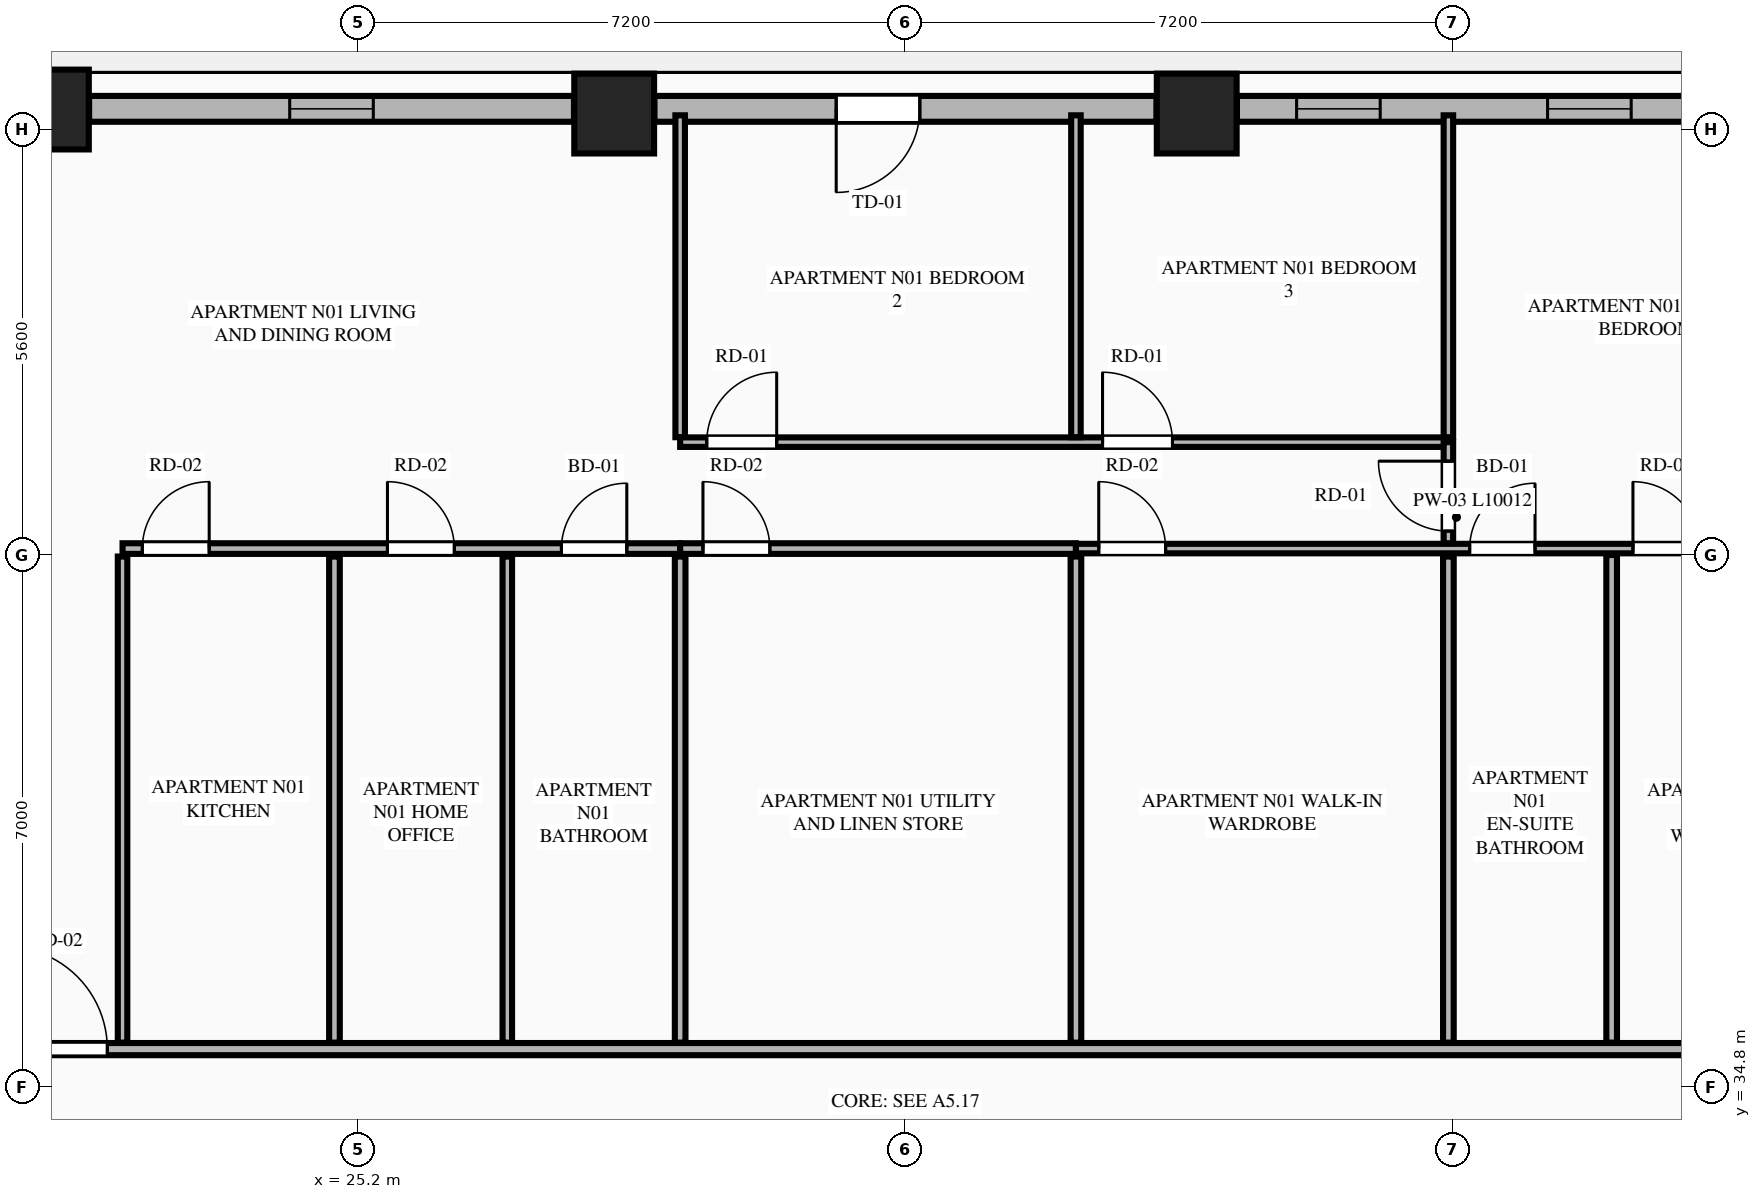
"""IFC4 building model, lengths in metres.
Left out: names, types, materials, properties, quantities, classifications, styles, units other than length and angle.
Written with IfcOpenShell. Run it as: python <this file> out.ifc"""

import sys

from ifc_helpers import new_model, si_unit, direction, frame, frame_2d, origin, origin_2d, place, context, subcontext, project, spatial, rectangle, extrude, element, fill, save


model = new_model("IFC4")
c1 = context("Model", 3, precision=1e-05, world=origin(), true_north=direction((0.0, 1.0)))
c2 = subcontext(c1, "Body", "Model", "MODEL_VIEW")
j1 = project(units=[si_unit("LENGTHUNIT", "METRE"), si_unit("PLANEANGLEUNIT", "RADIAN")], contexts=[c1])
p1 = place(None, origin())
s1 = spatial("IfcSite", under=j1, at=p1, CompositionType="ELEMENT")
p2 = place(p1, origin())
s2 = spatial("IfcBuilding", under=s1, at=p2, CompositionType="ELEMENT")
p3 = place(p2, frame((0.0, 0.0, 112.6)))
s3 = spatial("IfcBuildingStorey", under=s2, at=p3, CompositionType="ELEMENT", Elevation=112.6)
for number, where, z_axis, x_axis in (
    (1, (36.232, 47.608, 0.0), (0.0, 0.0, 1.0), (1.0, 0.0, 0.0)),
    (2, (28.568, 47.608, 0.0), (0.0, 0.0, 1.0), (1.0, 0.0, 0.0)),
    (3, (21.131, 47.661, 0.0), (0.0, 0.0, 1.0), (1.0, 0.0, 0.0)),
):
    element("IfcColumn", number, at=place(p3, frame(where, z_axis=z_axis, x_axis=x_axis)), inside=s3, PredefinedType="COLUMN", context=c2, shape_type="SweptSolid", body=[
        extrude(rectangle(XDim=1.05, YDim=1.05, at=origin_2d()), origin(), (0.0, 0.0, 1.0), 3.55),
    ])
p4 = place(p3, frame((43.14, 47.67, 0.0), z_axis=(0.0, 0.0, 1.0), x_axis=(-1.0, 0.0, 0.0)))
e4 = element("IfcWall", 4, at=p4, inside=s3, PredefinedType="STANDARD", context=c2, shape_type="SweptSolid", body=[
    extrude(rectangle(XDim=6.379, YDim=0.34, at=frame_2d((3.189, 0.0))), origin(), (0.0, 0.0, 1.0), 2.797),
])
p5 = place(p4, frame((1.192, 0.0, 0.75)))
e5 = element("IfcOpeningElement", 5, at=p5, cuts=e4, PredefinedType="OPENING", context=c2, shape_type="SweptSolid", body=[
    extrude(rectangle(XDim=1.1, YDim=1.897, at=frame_2d((0.55, 0.948))), frame((0.0, 0.18, 0.0), z_axis=(0.0, -1.0, 0.0), x_axis=(1.0, 0.0, 0.0)), (0.0, 0.0, 1.0), 0.36),
])
p6 = place(p4, frame((4.494, 0.0, 0.75)))
e6 = element("IfcOpeningElement", 6, at=p6, cuts=e4, PredefinedType="OPENING", context=c2, shape_type="SweptSolid", body=[
    extrude(rectangle(XDim=1.1, YDim=1.897, at=frame_2d((0.55, 0.948))), frame((0.0, 0.18, 0.0), z_axis=(0.0, -1.0, 0.0), x_axis=(1.0, 0.0, 0.0)), (0.0, 0.0, 1.0), 0.36),
])
p7 = place(p3, frame((35.703, 47.67, 0.0), z_axis=(0.0, 0.0, 1.0), x_axis=(-1.0, 0.0, 0.0)))
e7 = element("IfcWall", 7, at=p7, inside=s3, PredefinedType="STANDARD", context=c2, shape_type="SweptSolid", body=[
    extrude(rectangle(XDim=6.606, YDim=0.34, at=frame_2d((3.303, 0.0))), origin(), (0.0, 0.0, 1.0), 2.797),
])
p8 = place(p7, frame((3.114, 0.0, 0.0)))
e8 = element("IfcOpeningElement", 8, at=p8, cuts=e7, PredefinedType="OPENING", context=c2, shape_type="SweptSolid", body=[
    extrude(rectangle(XDim=1.1, YDim=2.25, at=frame_2d((0.55, 1.125))), frame((0.0, 0.18, 0.0), z_axis=(0.0, -1.0, 0.0), x_axis=(1.0, 0.0, 0.0)), (0.0, 0.0, 1.0), 0.36),
])
p9 = place(p3, frame((28.039, 47.67, 0.0), z_axis=(0.0, 0.0, 1.0), x_axis=(-1.0, 0.0, 0.0)))
e9 = element("IfcWall", 9, at=p9, inside=s3, PredefinedType="STANDARD", context=c2, shape_type="SweptSolid", body=[
    extrude(rectangle(XDim=6.379, YDim=0.34, at=frame_2d((3.189, 0.0))), origin(), (0.0, 0.0, 1.0), 2.797),
])
p10 = place(p9, frame((2.64, 0.0, 0.75)))
e10 = element("IfcOpeningElement", 10, at=p10, cuts=e9, PredefinedType="OPENING", context=c2, shape_type="SweptSolid", body=[
    extrude(rectangle(XDim=1.1, YDim=1.897, at=frame_2d((0.55, 0.948))), frame((0.0, 0.18, 0.0), z_axis=(0.0, -1.0, 0.0), x_axis=(1.0, 0.0, 0.0)), (0.0, 0.0, 1.0), 0.36),
])
p11 = place(p3, frame((20.145, 35.3, 0.0), z_axis=(0.0, 0.0, 1.0), x_axis=(1.0, 0.0, 0.0)))
e11 = element("IfcWall", 11, at=p11, inside=s3, PredefinedType="PARTITIONING", context=c2, shape_type="SweptSolid", body=[
    extrude(rectangle(XDim=24.51, YDim=0.16, at=frame_2d((12.255, 0.0))), origin(), (0.0, 0.0, 1.0), 3.34),
])
p12 = place(p11, frame((0.405, 0.0, 0.0)))
e12 = element("IfcOpeningElement", 12, at=p12, cuts=e11, PredefinedType="OPENING", context=c2, shape_type="SweptSolid", body=[
    extrude(rectangle(XDim=1.35, YDim=2.35, at=frame_2d((0.675, 1.175))), frame((0.0, 0.09, 0.0), z_axis=(0.0, -1.0, 0.0), x_axis=(1.0, 0.0, 0.0)), (0.0, 0.0, 1.0), 0.18),
])
p13 = place(p3, frame((22.1, 35.385, 0.0), z_axis=(0.0, 0.0, 1.0), x_axis=(0.0, 1.0, 0.0)))
e13 = element("IfcWall", 13, at=p13, inside=s3, PredefinedType="PARTITIONING", context=c2, shape_type="SweptSolid", body=[
    extrude(rectangle(XDim=6.395, YDim=0.125, at=frame_2d((3.198, 0.0))), origin(), (0.0, 0.0, 1.0), 2.722),
])
p14 = place(p3, frame((22.1, 41.885, 0.0), z_axis=(0.0, 0.0, 1.0), x_axis=(1.0, 0.0, 0.0)))
e14 = element("IfcWall", 14, at=p14, inside=s3, PredefinedType="PLUMBINGWALL", context=c2, shape_type="SweptSolid", body=[
    extrude(rectangle(XDim=7.336, YDim=0.14, at=frame_2d((3.668, 0.0))), origin(), (0.0, 0.0, 1.0), 3.34),
])
p15 = place(p14, frame((5.774, 0.0, 0.0)))
e15 = element("IfcOpeningElement", 15, at=p15, cuts=e14, PredefinedType="OPENING", context=c2, shape_type="SweptSolid", body=[
    extrude(rectangle(XDim=0.86, YDim=2.1, at=frame_2d((0.43, 1.05))), frame((0.0, 0.08, 0.0), z_axis=(0.0, -1.0, 0.0), x_axis=(1.0, 0.0, 0.0)), (0.0, 0.0, 1.0), 0.16),
])
p16 = place(p14, frame((0.26, 0.0, 0.0)))
e16 = element("IfcOpeningElement", 16, at=p16, cuts=e14, PredefinedType="OPENING", context=c2, shape_type="SweptSolid", body=[
    extrude(rectangle(XDim=0.88, YDim=2.15, at=frame_2d((0.44, 1.075))), frame((0.0, 0.08, 0.0), z_axis=(0.0, -1.0, 0.0), x_axis=(1.0, 0.0, 0.0)), (0.0, 0.0, 1.0), 0.16),
])
p17 = place(p14, frame((3.485, 0.0, 0.0)))
e17 = element("IfcOpeningElement", 17, at=p17, cuts=e14, PredefinedType="OPENING", context=c2, shape_type="SweptSolid", body=[
    extrude(rectangle(XDim=0.88, YDim=2.15, at=frame_2d((0.44, 1.075))), frame((0.0, 0.08, 0.0), z_axis=(0.0, -1.0, 0.0), x_axis=(1.0, 0.0, 0.0)), (0.0, 0.0, 1.0), 0.16),
])
p18 = place(p3, frame((29.436, 41.885, 0.0), z_axis=(0.0, 0.0, 1.0), x_axis=(1.0, 0.0, 0.0)))
e18 = element("IfcWall", 18, at=p18, inside=s3, PredefinedType="PLUMBINGWALL", context=c2, shape_type="SweptSolid", body=[
    extrude(rectangle(XDim=5.207, YDim=0.14, at=frame_2d((2.604, 0.0))), origin(), (0.0, 0.0, 1.0), 3.34),
])
p19 = place(p18, frame((0.3, 0.0, 0.0)))
e19 = element("IfcOpeningElement", 19, at=p19, cuts=e18, PredefinedType="OPENING", context=c2, shape_type="SweptSolid", body=[
    extrude(rectangle(XDim=0.88, YDim=2.15, at=frame_2d((0.44, 1.075))), frame((0.0, 0.08, 0.0), z_axis=(0.0, -1.0, 0.0), x_axis=(1.0, 0.0, 0.0)), (0.0, 0.0, 1.0), 0.16),
])
p20 = place(p3, frame((34.643, 41.885, 0.0), z_axis=(0.0, 0.0, 1.0), x_axis=(1.0, 0.0, 0.0)))
e20 = element("IfcWall", 20, at=p20, inside=s3, PredefinedType="PARTITIONING", context=c2, shape_type="SweptSolid", body=[
    extrude(rectangle(XDim=10.012, YDim=0.125, at=frame_2d((5.006, 0.0))), origin(), (0.0, 0.0, 1.0), 3.34),
])
p21 = place(p20, frame((5.18, 0.0, 0.0)))
e21 = element("IfcOpeningElement", 21, at=p21, cuts=e20, PredefinedType="OPENING", context=c2, shape_type="SweptSolid", body=[
    extrude(rectangle(XDim=0.86, YDim=2.1, at=frame_2d((0.43, 1.05))), frame((0.0, 0.073, 0.0), z_axis=(0.0, -1.0, 0.0), x_axis=(1.0, 0.0, 0.0)), (0.0, 0.0, 1.0), 0.145),
])
p22 = place(p20, frame((7.328, 0.0, 0.0)))
e22 = element("IfcOpeningElement", 22, at=p22, cuts=e20, PredefinedType="OPENING", context=c2, shape_type="SweptSolid", body=[
    extrude(rectangle(XDim=0.88, YDim=2.15, at=frame_2d((0.44, 1.075))), frame((0.0, 0.073, 0.0), z_axis=(0.0, -1.0, 0.0), x_axis=(1.0, 0.0, 0.0)), (0.0, 0.0, 1.0), 0.145),
])
p23 = place(p20, frame((0.3, 0.0, 0.0)))
e23 = element("IfcOpeningElement", 23, at=p23, cuts=e20, PredefinedType="OPENING", context=c2, shape_type="SweptSolid", body=[
    extrude(rectangle(XDim=0.88, YDim=2.15, at=frame_2d((0.44, 1.075))), frame((0.0, 0.073, 0.0), z_axis=(0.0, -1.0, 0.0), x_axis=(1.0, 0.0, 0.0)), (0.0, 0.0, 1.0), 0.145),
])
p24 = place(p3, frame((24.888, 35.385, 0.0), z_axis=(0.0, 0.0, 1.0), x_axis=(0.0, 1.0, 0.0)))
e24 = element("IfcWall", 24, at=p24, inside=s3, PredefinedType="PLUMBINGWALL", context=c2, shape_type="SweptSolid", body=[
    extrude(rectangle(XDim=6.395, YDim=0.14, at=frame_2d((3.198, 0.0))), origin(), (0.0, 0.0, 1.0), 3.34),
])
p25 = place(p3, frame((27.162, 35.385, 0.0), z_axis=(0.0, 0.0, 1.0), x_axis=(0.0, 1.0, 0.0)))
e25 = element("IfcWall", 25, at=p25, inside=s3, PredefinedType="PARTITIONING", context=c2, shape_type="SweptSolid", body=[
    extrude(rectangle(XDim=6.395, YDim=0.125, at=frame_2d((3.198, 0.0))), origin(), (0.0, 0.0, 1.0), 3.34),
])
p26 = place(p3, frame((29.436, 43.35, 0.0), z_axis=(0.0, 0.0, 1.0), x_axis=(0.0, 1.0, 0.0)))
e26 = element("IfcWall", 26, at=p26, inside=s3, PredefinedType="PARTITIONING", context=c2, shape_type="SweptSolid", body=[
    extrude(rectangle(XDim=4.235, YDim=0.125, at=frame_2d((2.117, 0.0))), origin(), (0.0, 0.0, 1.0), 3.34),
])
p27 = place(p3, frame((29.436, 43.285, 0.0), z_axis=(0.0, 0.0, 1.0), x_axis=(1.0, 0.0, 0.0)))
e27 = element("IfcWall", 27, at=p27, inside=s3, PredefinedType="PARTITIONING", context=c2, shape_type="SweptSolid", body=[
    extrude(rectangle(XDim=10.107, YDim=0.125, at=frame_2d((5.053, 0.0))), origin(), (0.0, 0.0, 1.0), 3.34),
])
p28 = place(p27, frame((0.35, 0.0, 0.0)))
e28 = element("IfcOpeningElement", 28, at=p28, cuts=e27, PredefinedType="OPENING", context=c2, shape_type="SweptSolid", body=[
    extrude(rectangle(XDim=0.92, YDim=2.15, at=frame_2d((0.46, 1.075))), frame((0.0, 0.073, 0.0), z_axis=(0.0, -1.0, 0.0), x_axis=(1.0, 0.0, 0.0)), (0.0, 0.0, 1.0), 0.145),
])
p29 = place(p27, frame((5.557, 0.0, 0.0)))
e29 = element("IfcOpeningElement", 29, at=p29, cuts=e27, PredefinedType="OPENING", context=c2, shape_type="SweptSolid", body=[
    extrude(rectangle(XDim=0.92, YDim=2.15, at=frame_2d((0.46, 1.075))), frame((0.0, 0.073, 0.0), z_axis=(0.0, -1.0, 0.0), x_axis=(1.0, 0.0, 0.0)), (0.0, 0.0, 1.0), 0.145),
])
p30 = place(p3, frame((39.543, 41.955, 0.0), z_axis=(0.0, 0.0, 1.0), x_axis=(0.0, 1.0, 0.0)))
e30 = element("IfcWall", 30, at=p30, inside=s3, PredefinedType="PARTITIONING", context=c2, shape_type="SweptSolid", body=[
    extrude(rectangle(XDim=1.33, YDim=0.125, at=frame_2d((0.665, 0.0))), origin(), (0.0, 0.0, 1.0), 3.34),
])
p31 = place(p30, frame((0.16, 0.0, 0.0)))
e31 = element("IfcOpeningElement", 31, at=p31, cuts=e30, PredefinedType="OPENING", context=c2, shape_type="SweptSolid", body=[
    extrude(rectangle(XDim=0.92, YDim=2.15, at=frame_2d((0.46, 1.075))), frame((0.0, 0.073, 0.0), z_axis=(0.0, -1.0, 0.0), x_axis=(1.0, 0.0, 0.0)), (0.0, 0.0, 1.0), 0.145),
])
for number, where, z_axis, x_axis in (
    (32, (29.436, 35.385, 0.0), (0.0, 0.0, 1.0), (0.0, 1.0, 0.0)),
    (33, (34.643, 35.385, 0.0), (0.0, 0.0, 1.0), (0.0, 1.0, 0.0)),
):
    element("IfcWall", number, at=place(p3, frame(where, z_axis=z_axis, x_axis=x_axis)), inside=s3, PredefinedType="PLUMBINGWALL", context=c2, shape_type="SweptSolid", body=[
        extrude(rectangle(XDim=6.395, YDim=0.14, at=frame_2d((3.198, 0.0))), origin(), (0.0, 0.0, 1.0), 3.34),
    ])
for number, where, z_axis, x_axis in (
    (34, (34.643, 43.35, 0.0), (0.0, 0.0, 1.0), (0.0, 1.0, 0.0)),
    (35, (39.543, 43.35, 0.0), (0.0, 0.0, 1.0), (0.0, 1.0, 0.0)),
):
    element("IfcWall", number, at=place(p3, frame(where, z_axis=z_axis, x_axis=x_axis)), inside=s3, PredefinedType="PARTITIONING", context=c2, shape_type="SweptSolid", body=[
        extrude(rectangle(XDim=4.235, YDim=0.125, at=frame_2d((2.117, 0.0))), origin(), (0.0, 0.0, 1.0), 3.34),
    ])
p32 = place(p3, frame((39.543, 35.385, 0.0), z_axis=(0.0, 0.0, 1.0), x_axis=(0.0, 1.0, 0.0)))
e36 = element("IfcWall", 36, at=p32, inside=s3, PredefinedType="PLUMBINGWALL", context=c2, shape_type="SweptSolid", body=[
    extrude(rectangle(XDim=6.395, YDim=0.14, at=frame_2d((3.198, 0.0))), origin(), (0.0, 0.0, 1.0), 3.34),
])
p33 = place(p3, frame((41.691, 35.385, 0.0), z_axis=(0.0, 0.0, 1.0), x_axis=(0.0, 1.0, 0.0)))
e37 = element("IfcWall", 37, at=p33, inside=s3, PredefinedType="PLUMBINGWALL", context=c2, shape_type="SweptSolid", body=[
    extrude(rectangle(XDim=6.415, YDim=0.14, at=frame_2d((3.208, 0.0))), origin(), (0.0, 0.0, 1.0), 2.722),
])
p34 = place(p5, origin())
e38 = element("IfcWindow", 38, at=p34, inside=s3, PartitioningType="SINGLE_PANEL", PredefinedType="WINDOW", context=c2, shape_type="SweptSolid", body=[
    extrude(rectangle(XDim=1.1, YDim=1.897, at=frame_2d((0.55, 0.948))), frame((0.0, 0.03, 0.0), z_axis=(0.0, -1.0, 0.0), x_axis=(1.0, 0.0, 0.0)), (0.0, 0.0, 1.0), 0.06),
])
fill(e5, e38)
p35 = place(p8, origin())
e39 = element("IfcDoor", 39, at=p35, inside=s3, OperationType="SINGLE_SWING_RIGHT", PredefinedType="DOOR", context=c2, shape_type="SweptSolid", body=[
    extrude(rectangle(XDim=1.1, YDim=2.25, at=frame_2d((0.55, 1.125))), frame((0.0, 0.025, 0.0), z_axis=(0.0, -1.0, 0.0), x_axis=(1.0, 0.0, 0.0)), (0.0, 0.0, 1.0), 0.05),
])
fill(e8, e39)
p36 = place(p10, origin())
e40 = element("IfcWindow", 40, at=p36, inside=s3, PartitioningType="SINGLE_PANEL", PredefinedType="WINDOW", context=c2, shape_type="SweptSolid", body=[
    extrude(rectangle(XDim=1.1, YDim=1.897, at=frame_2d((0.55, 0.948))), frame((0.0, 0.03, 0.0), z_axis=(0.0, -1.0, 0.0), x_axis=(1.0, 0.0, 0.0)), (0.0, 0.0, 1.0), 0.06),
])
fill(e10, e40)
p37 = place(p15, origin())
e41 = element("IfcDoor", 41, at=p37, inside=s3, OperationType="SINGLE_SWING_RIGHT", PredefinedType="DOOR", context=c2, shape_type="SweptSolid", body=[
    extrude(rectangle(XDim=0.86, YDim=2.1, at=frame_2d((0.43, 1.05))), frame((0.0, 0.025, 0.0), z_axis=(0.0, -1.0, 0.0), x_axis=(1.0, 0.0, 0.0)), (0.0, 0.0, 1.0), 0.05),
])
fill(e15, e41)
p38 = place(p21, origin())
e42 = element("IfcDoor", 42, at=p38, inside=s3, OperationType="SINGLE_SWING_RIGHT", PredefinedType="DOOR", context=c2, shape_type="SweptSolid", body=[
    extrude(rectangle(XDim=0.86, YDim=2.1, at=frame_2d((0.43, 1.05))), frame((0.0, 0.025, 0.0), z_axis=(0.0, -1.0, 0.0), x_axis=(1.0, 0.0, 0.0)), (0.0, 0.0, 1.0), 0.05),
])
fill(e21, e42)
p39 = place(p22, origin())
e43 = element("IfcDoor", 43, at=p39, inside=s3, OperationType="SINGLE_SWING_LEFT", PredefinedType="DOOR", context=c2, shape_type="SweptSolid", body=[
    extrude(rectangle(XDim=0.88, YDim=2.15, at=frame_2d((0.44, 1.075))), frame((0.0, 0.025, 0.0), z_axis=(0.0, -1.0, 0.0), x_axis=(1.0, 0.0, 0.0)), (0.0, 0.0, 1.0), 0.05),
])
fill(e22, e43)
p40 = place(p12, origin())
e44 = element("IfcDoor", 44, at=p40, inside=s3, OperationType="SINGLE_SWING_LEFT", PredefinedType="DOOR", context=c2, shape_type="SweptSolid", body=[
    extrude(rectangle(XDim=1.35, YDim=2.35, at=frame_2d((0.675, 1.175))), frame((0.0, 0.025, 0.0), z_axis=(0.0, -1.0, 0.0), x_axis=(1.0, 0.0, 0.0)), (0.0, 0.0, 1.0), 0.05),
])
fill(e12, e44)
p41 = place(p16, origin())
e45 = element("IfcDoor", 45, at=p41, inside=s3, OperationType="SINGLE_SWING_RIGHT", PredefinedType="DOOR", context=c2, shape_type="SweptSolid", body=[
    extrude(rectangle(XDim=0.88, YDim=2.15, at=frame_2d((0.44, 1.075))), frame((0.0, 0.025, 0.0), z_axis=(0.0, -1.0, 0.0), x_axis=(1.0, 0.0, 0.0)), (0.0, 0.0, 1.0), 0.05),
])
fill(e16, e45)
p42 = place(p17, origin())
e46 = element("IfcDoor", 46, at=p42, inside=s3, OperationType="SINGLE_SWING_LEFT", PredefinedType="DOOR", context=c2, shape_type="SweptSolid", body=[
    extrude(rectangle(XDim=0.88, YDim=2.15, at=frame_2d((0.44, 1.075))), frame((0.0, 0.025, 0.0), z_axis=(0.0, -1.0, 0.0), x_axis=(1.0, 0.0, 0.0)), (0.0, 0.0, 1.0), 0.05),
])
fill(e17, e46)
p43 = place(p19, origin())
e47 = element("IfcDoor", 47, at=p43, inside=s3, OperationType="SINGLE_SWING_LEFT", PredefinedType="DOOR", context=c2, shape_type="SweptSolid", body=[
    extrude(rectangle(XDim=0.88, YDim=2.15, at=frame_2d((0.44, 1.075))), frame((0.0, 0.025, 0.0), z_axis=(0.0, -1.0, 0.0), x_axis=(1.0, 0.0, 0.0)), (0.0, 0.0, 1.0), 0.05),
])
fill(e19, e47)
p44 = place(p28, origin())
e48 = element("IfcDoor", 48, at=p44, inside=s3, OperationType="SINGLE_SWING_RIGHT", PredefinedType="DOOR", context=c2, shape_type="SweptSolid", body=[
    extrude(rectangle(XDim=0.92, YDim=2.15, at=frame_2d((0.46, 1.075))), frame((0.0, 0.025, 0.0), z_axis=(0.0, -1.0, 0.0), x_axis=(1.0, 0.0, 0.0)), (0.0, 0.0, 1.0), 0.05),
])
fill(e28, e48)
p45 = place(p29, origin())
e49 = element("IfcDoor", 49, at=p45, inside=s3, OperationType="SINGLE_SWING_LEFT", PredefinedType="DOOR", context=c2, shape_type="SweptSolid", body=[
    extrude(rectangle(XDim=0.92, YDim=2.15, at=frame_2d((0.46, 1.075))), frame((0.0, 0.025, 0.0), z_axis=(0.0, -1.0, 0.0), x_axis=(1.0, 0.0, 0.0)), (0.0, 0.0, 1.0), 0.05),
])
fill(e29, e49)
p46 = place(p31, origin())
e50 = element("IfcDoor", 50, at=p46, inside=s3, OperationType="SINGLE_SWING_RIGHT", PredefinedType="DOOR", context=c2, shape_type="SweptSolid", body=[
    extrude(rectangle(XDim=0.92, YDim=2.15, at=frame_2d((0.46, 1.075))), frame((0.0, 0.025, 0.0), z_axis=(0.0, -1.0, 0.0), x_axis=(1.0, 0.0, 0.0)), (0.0, 0.0, 1.0), 0.05),
])
fill(e31, e50)
p47 = place(p23, origin())
e51 = element("IfcDoor", 51, at=p47, inside=s3, OperationType="SINGLE_SWING_LEFT", PredefinedType="DOOR", context=c2, shape_type="SweptSolid", body=[
    extrude(rectangle(XDim=0.88, YDim=2.15, at=frame_2d((0.44, 1.075))), frame((0.0, 0.025, 0.0), z_axis=(0.0, -1.0, 0.0), x_axis=(1.0, 0.0, 0.0)), (0.0, 0.0, 1.0), 0.05),
])
fill(e23, e51)
p48 = place(p6, origin())
e52 = element("IfcWindow", 52, at=p48, inside=s3, PartitioningType="SINGLE_PANEL", PredefinedType="WINDOW", context=c2, shape_type="SweptSolid", body=[
    extrude(rectangle(XDim=1.1, YDim=1.897, at=frame_2d((0.55, 0.948))), frame((0.0, 0.03, 0.0), z_axis=(0.0, -1.0, 0.0), x_axis=(1.0, 0.0, 0.0)), (0.0, 0.0, 1.0), 0.06),
])
fill(e6, e52)
save(model, sys.argv[1])
